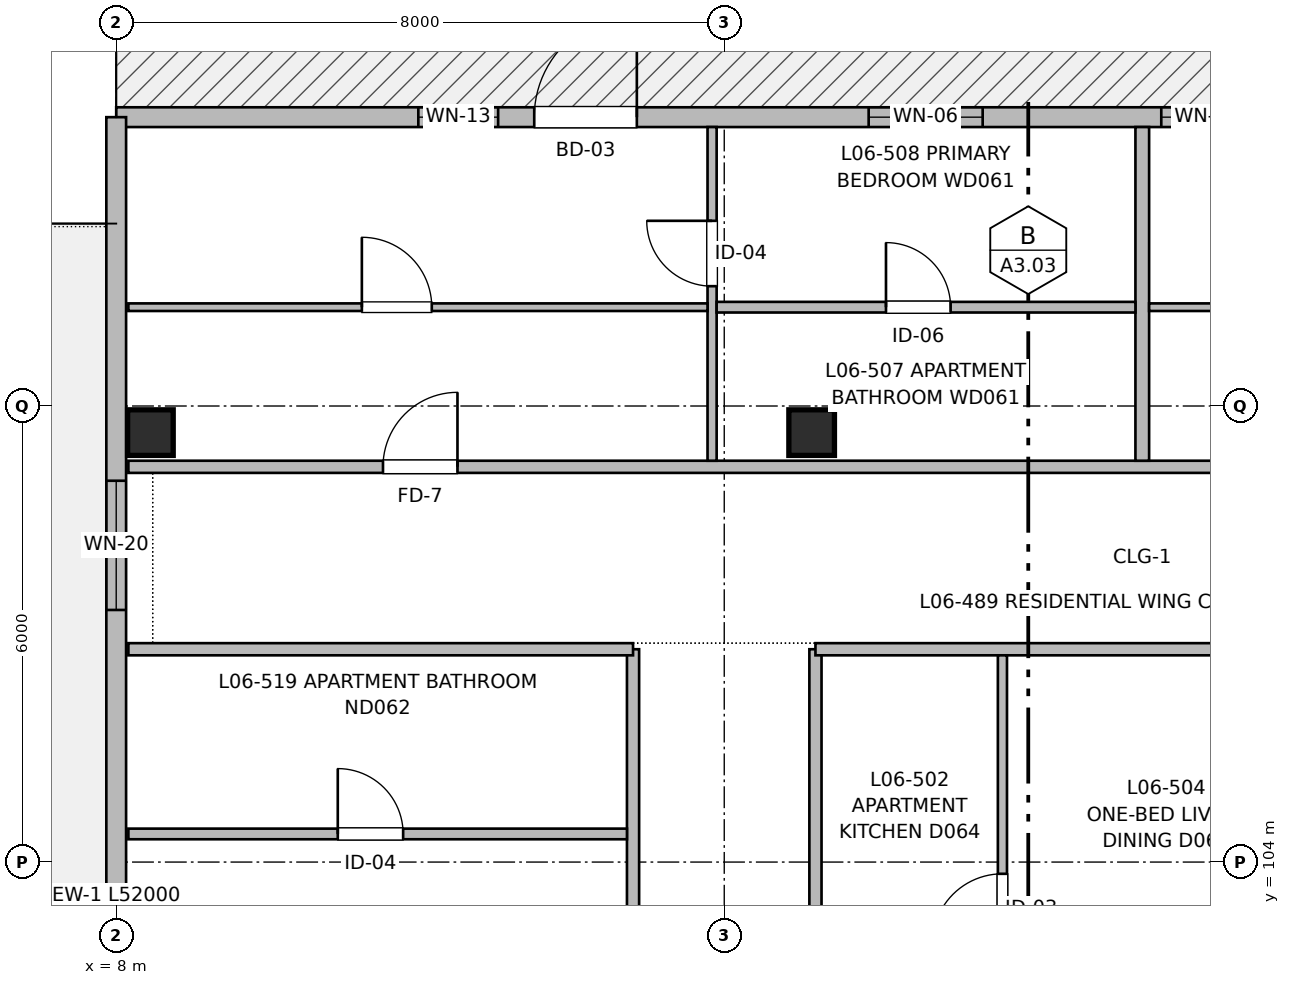
"""IFC4 building model, lengths in metres.
Left out: names, types, materials, properties, quantities, classifications, styles, units other than length and angle.
Written with IfcOpenShell. Run it as: python <this file> out.ifc"""

import sys

from ifc_helpers import new_model, si_unit, direction, frame, frame_2d, origin, origin_2d, place, context, subcontext, project, spatial, rectangle, extrude, element, fill, save


model = new_model("IFC4")
c1 = context("Model", 3, precision=1e-05, world=origin(), true_north=direction((0.0, 1.0)))
c2 = subcontext(c1, "Body", "Model", "MODEL_VIEW")
j1 = project(units=[si_unit("LENGTHUNIT", "METRE"), si_unit("PLANEANGLEUNIT", "RADIAN")], contexts=[c1])
p1 = place(None, origin())
s1 = spatial("IfcSite", under=j1, at=p1, CompositionType="ELEMENT")
p2 = place(p1, origin())
s2 = spatial("IfcBuilding", under=s1, at=p2, CompositionType="ELEMENT")
p3 = place(p2, frame((0.0, 0.0, 20.16)))
s3 = spatial("IfcBuildingStorey", under=s2, at=p3, CompositionType="ELEMENT", Elevation=20.16)
for number, where, z_axis, x_axis in (
    (1, (8.45, 109.65, 0.0), (0.0, 0.0, 1.0), (1.0, 0.0, 0.0)),
    (2, (17.15, 109.65, 0.0), (0.0, 0.0, 1.0), (1.0, 0.0, 0.0)),
):
    element("IfcColumn", number, at=place(p3, frame(where, z_axis=z_axis, x_axis=x_axis)), inside=s3, PredefinedType="COLUMN", context=c2, shape_type="SweptSolid", body=[
        extrude(rectangle(XDim=0.6, YDim=0.6, at=origin_2d()), origin(), (0.0, 0.0, 1.0), 3.2),
    ])
p4 = place(p3, frame((8.0, 113.8, 0.0), z_axis=(0.0, 0.0, 1.0), x_axis=(1.0, 0.0, 0.0)))
e3 = element("IfcWall", 3, at=p4, inside=s3, PredefinedType="SOLIDWALL", context=c2, shape_type="SweptSolid", body=[
    extrude(rectangle(XDim=27.0, YDim=0.26, at=frame_2d((13.5, 0.0))), origin(), (0.0, 0.0, 1.0), 2.98),
])
p5 = place(p4, frame((5.5, 0.0, 0.0)))
e4 = element("IfcOpeningElement", 4, at=p5, cuts=e3, PredefinedType="OPENING", context=c2, shape_type="SweptSolid", body=[
    extrude(rectangle(XDim=1.35, YDim=2.2, at=frame_2d((0.675, 1.1))), frame((0.0, 0.14, 0.0), z_axis=(0.0, -1.0, 0.0), x_axis=(1.0, 0.0, 0.0)), (0.0, 0.0, 1.0), 0.28),
])
p6 = place(p4, frame((3.975, 0.0, 0.9)))
e5 = element("IfcOpeningElement", 5, at=p6, cuts=e3, PredefinedType="OPENING", context=c2, shape_type="SweptSolid", body=[
    extrude(rectangle(XDim=1.05, YDim=1.15, at=frame_2d((0.525, 0.575))), frame((0.0, 0.14, 0.0), z_axis=(0.0, -1.0, 0.0), x_axis=(1.0, 0.0, 0.0)), (0.0, 0.0, 1.0), 0.28),
])
p7 = place(p4, frame((13.75, 0.0, 0.9)))
e6 = element("IfcOpeningElement", 6, at=p7, cuts=e3, PredefinedType="OPENING", context=c2, shape_type="SweptSolid", body=[
    extrude(rectangle(XDim=1.2, YDim=1.05, at=frame_2d((0.6, 0.525))), frame((0.0, 0.14, 0.0), z_axis=(0.0, -1.0, 0.0), x_axis=(1.0, 0.0, 0.0)), (0.0, 0.0, 1.0), 0.28),
])
p8 = place(p4, frame((22.175, 0.0, 0.9)))
e7 = element("IfcOpeningElement", 7, at=p8, cuts=e3, PredefinedType="OPENING", context=c2, shape_type="SweptSolid", body=[
    extrude(rectangle(XDim=0.65, YDim=0.95, at=frame_2d((0.325, 0.475))), frame((0.0, 0.14, 0.0), z_axis=(0.0, -1.0, 0.0), x_axis=(1.0, 0.0, 0.0)), (0.0, 0.0, 1.0), 0.28),
])
p9 = place(p4, frame((9.9, 0.0, 0.82)))
e8 = element("IfcOpeningElement", 8, at=p9, cuts=e3, PredefinedType="OPENING", context=c2, shape_type="SweptSolid", body=[
    extrude(rectangle(XDim=1.5, YDim=1.4, at=frame_2d((0.75, 0.7))), frame((0.0, 0.14, 0.0), z_axis=(0.0, -1.0, 0.0), x_axis=(1.0, 0.0, 0.0)), (0.0, 0.0, 1.0), 0.28),
])
p10 = place(p3, frame((8.0, 61.8, 0.0), z_axis=(0.0, 0.0, 1.0), x_axis=(0.0, 1.0, 0.0)))
e9 = element("IfcWall", 9, at=p10, inside=s3, PredefinedType="SOLIDWALL", context=c2, shape_type="SweptSolid", body=[
    extrude(rectangle(XDim=52.0, YDim=0.26, at=frame_2d((26.0, 0.0))), origin(), (0.0, 0.0, 1.0), 2.98),
])
p11 = place(p10, frame((3.283, 0.0, 0.0)))
e10 = element("IfcOpeningElement", 10, at=p11, cuts=e9, PredefinedType="OPENING", context=c2, shape_type="SweptSolid", body=[
    extrude(rectangle(XDim=1.2, YDim=2.2, at=frame_2d((0.6, 1.1))), frame((0.0, 0.14, 0.0), z_axis=(0.0, -1.0, 0.0), x_axis=(1.0, 0.0, 0.0)), (0.0, 0.0, 1.0), 0.28),
])
p12 = place(p10, frame((6.083, 0.0, 0.57)))
e11 = element("IfcOpeningElement", 11, at=p12, cuts=e9, PredefinedType="OPENING", context=c2, shape_type="SweptSolid", body=[
    extrude(rectangle(XDim=2.3, YDim=1.65, at=frame_2d((1.15, 0.825))), frame((0.0, 0.14, 0.0), z_axis=(0.0, -1.0, 0.0), x_axis=(1.0, 0.0, 0.0)), (0.0, 0.0, 1.0), 0.28),
])
p13 = place(p10, frame((12.85, 0.0, 0.9)))
e12 = element("IfcOpeningElement", 12, at=p13, cuts=e9, PredefinedType="OPENING", context=c2, shape_type="SweptSolid", body=[
    extrude(rectangle(XDim=1.2, YDim=1.05, at=frame_2d((0.6, 0.525))), frame((0.0, 0.14, 0.0), z_axis=(0.0, -1.0, 0.0), x_axis=(1.0, 0.0, 0.0)), (0.0, 0.0, 1.0), 0.28),
])
p14 = place(p10, frame((21.342, 0.0, 0.9)))
e13 = element("IfcOpeningElement", 13, at=p14, cuts=e9, PredefinedType="OPENING", context=c2, shape_type="SweptSolid", body=[
    extrude(rectangle(XDim=0.65, YDim=0.95, at=frame_2d((0.325, 0.475))), frame((0.0, 0.14, 0.0), z_axis=(0.0, -1.0, 0.0), x_axis=(1.0, 0.0, 0.0)), (0.0, 0.0, 1.0), 0.28),
])
p15 = place(p10, frame((29.333, 0.0, 0.62)))
e14 = element("IfcOpeningElement", 14, at=p15, cuts=e9, PredefinedType="OPENING", context=c2, shape_type="SweptSolid", body=[
    extrude(rectangle(XDim=1.1, YDim=1.6, at=frame_2d((0.55, 0.8))), frame((0.0, 0.14, 0.0), z_axis=(0.0, -1.0, 0.0), x_axis=(1.0, 0.0, 0.0)), (0.0, 0.0, 1.0), 0.28),
])
p16 = place(p10, frame((35.3, 0.0, 0.47)))
e15 = element("IfcOpeningElement", 15, at=p16, cuts=e9, PredefinedType="OPENING", context=c2, shape_type="SweptSolid", body=[
    extrude(rectangle(XDim=2.7, YDim=1.75, at=frame_2d((1.35, 0.875))), frame((0.0, 0.14, 0.0), z_axis=(0.0, -1.0, 0.0), x_axis=(1.0, 0.0, 0.0)), (0.0, 0.0, 1.0), 0.28),
])
p17 = place(p10, frame((45.517, 0.0, 0.72)))
e16 = element("IfcOpeningElement", 16, at=p17, cuts=e9, PredefinedType="OPENING", context=c2, shape_type="SweptSolid", body=[
    extrude(rectangle(XDim=1.7, YDim=1.5, at=frame_2d((0.85, 0.75))), frame((0.0, 0.14, 0.0), z_axis=(0.0, -1.0, 0.0), x_axis=(1.0, 0.0, 0.0)), (0.0, 0.0, 1.0), 0.28),
])
p18 = place(p3, frame((14.8, 61.96, 0.0), z_axis=(0.0, 0.0, 1.0), x_axis=(0.0, 1.0, 0.0)))
e17 = element("IfcWall", 17, at=p18, inside=s3, PredefinedType="PARTITIONING", context=c2, shape_type="SweptSolid", body=[
    extrude(rectangle(XDim=44.84, YDim=0.16, at=frame_2d((22.42, 0.0))), origin(), (0.0, 0.0, 1.0), 2.935),
])
p19 = place(p18, frame((7.04, 0.0, 0.0)))
e18 = element("IfcOpeningElement", 18, at=p19, cuts=e17, PredefinedType="OPENING", context=c2, shape_type="SweptSolid", body=[
    extrude(rectangle(XDim=1.1, YDim=2.15, at=frame_2d((0.55, 1.075))), frame((0.0, 0.09, 0.0), z_axis=(0.0, -1.0, 0.0), x_axis=(1.0, 0.0, 0.0)), (0.0, 0.0, 1.0), 0.18),
])
p20 = place(p18, frame((13.44, 0.0, 0.0)))
e19 = element("IfcOpeningElement", 19, at=p20, cuts=e17, PredefinedType="OPENING", context=c2, shape_type="SweptSolid", body=[
    extrude(rectangle(XDim=1.6, YDim=2.15, at=frame_2d((0.8, 1.075))), frame((0.0, 0.09, 0.0), z_axis=(0.0, -1.0, 0.0), x_axis=(1.0, 0.0, 0.0)), (0.0, 0.0, 1.0), 0.18),
])
p21 = place(p18, frame((3.0, 0.0, 0.0)))
e20 = element("IfcOpeningElement", 20, at=p21, cuts=e17, PredefinedType="OPENING", context=c2, shape_type="SweptSolid", body=[
    extrude(rectangle(XDim=0.96, YDim=2.15, at=frame_2d((0.48, 1.075))), frame((0.0, 0.09, 0.0), z_axis=(0.0, -1.0, 0.0), x_axis=(1.0, 0.0, 0.0)), (0.0, 0.0, 1.0), 0.18),
])
p22 = place(p18, frame((27.045, 0.0, 0.0)))
e21 = element("IfcOpeningElement", 21, at=p22, cuts=e17, PredefinedType="OPENING", context=c2, shape_type="SweptSolid", body=[
    extrude(rectangle(XDim=0.98, YDim=2.15, at=frame_2d((0.49, 1.075))), frame((0.0, 0.09, 0.0), z_axis=(0.0, -1.0, 0.0), x_axis=(1.0, 0.0, 0.0)), (0.0, 0.0, 1.0), 0.18),
])
p23 = place(p18, frame((34.855, 0.0, 0.0)))
e22 = element("IfcOpeningElement", 22, at=p23, cuts=e17, PredefinedType="OPENING", context=c2, shape_type="SweptSolid", body=[
    extrude(rectangle(XDim=0.98, YDim=2.15, at=frame_2d((0.49, 1.075))), frame((0.0, 0.09, 0.0), z_axis=(0.0, -1.0, 0.0), x_axis=(1.0, 0.0, 0.0)), (0.0, 0.0, 1.0), 0.18),
])
p24 = place(p3, frame((17.2, 61.96, 0.0), z_axis=(0.0, 0.0, 1.0), x_axis=(0.0, 1.0, 0.0)))
e23 = element("IfcWall", 23, at=p24, inside=s3, PredefinedType="PARTITIONING", context=c2, shape_type="SweptSolid", body=[
    extrude(rectangle(XDim=44.84, YDim=0.16, at=frame_2d((22.42, 0.0))), origin(), (0.0, 0.0, 1.0), 2.935),
])
p25 = place(p24, frame((4.575, 0.0, 0.0)))
e24 = element("IfcOpeningElement", 24, at=p25, cuts=e23, PredefinedType="OPENING", context=c2, shape_type="SweptSolid", body=[
    extrude(rectangle(XDim=1.5, YDim=2.2, at=frame_2d((0.75, 1.1))), frame((0.0, 0.09, 0.0), z_axis=(0.0, -1.0, 0.0), x_axis=(1.0, 0.0, 0.0)), (0.0, 0.0, 1.0), 0.18),
])
p26 = place(p24, frame((17.27, 0.0, 0.0)))
e25 = element("IfcOpeningElement", 25, at=p26, cuts=e23, PredefinedType="OPENING", context=c2, shape_type="SweptSolid", body=[
    extrude(rectangle(XDim=0.98, YDim=2.15, at=frame_2d((0.49, 1.075))), frame((0.0, 0.09, 0.0), z_axis=(0.0, -1.0, 0.0), x_axis=(1.0, 0.0, 0.0)), (0.0, 0.0, 1.0), 0.18),
])
p27 = place(p24, frame((29.39, 0.0, 0.0)))
e26 = element("IfcOpeningElement", 26, at=p27, cuts=e23, PredefinedType="OPENING", context=c2, shape_type="SweptSolid", body=[
    extrude(rectangle(XDim=0.98, YDim=2.15, at=frame_2d((0.49, 1.075))), frame((0.0, 0.09, 0.0), z_axis=(0.0, -1.0, 0.0), x_axis=(1.0, 0.0, 0.0)), (0.0, 0.0, 1.0), 0.18),
])
p28 = place(p24, frame((40.24, 0.0, 0.0)))
e27 = element("IfcOpeningElement", 27, at=p28, cuts=e23, PredefinedType="OPENING", context=c2, shape_type="SweptSolid", body=[
    extrude(rectangle(XDim=0.98, YDim=2.15, at=frame_2d((0.49, 1.075))), frame((0.0, 0.09, 0.0), z_axis=(0.0, -1.0, 0.0), x_axis=(1.0, 0.0, 0.0)), (0.0, 0.0, 1.0), 0.18),
])
p29 = place(p3, frame((8.16, 106.8, 0.0), z_axis=(0.0, 0.0, 1.0), x_axis=(1.0, 0.0, 0.0)))
e28 = element("IfcWall", 28, at=p29, inside=s3, PredefinedType="PARTITIONING", context=c2, shape_type="SweptSolid", body=[
    extrude(rectangle(XDim=6.64, YDim=0.16, at=frame_2d((3.32, 0.0))), origin(), (0.0, 0.0, 1.0), 2.935),
])
p30 = place(p3, frame((17.2, 106.8, 0.0), z_axis=(0.0, 0.0, 1.0), x_axis=(1.0, 0.0, 0.0)))
e29 = element("IfcWall", 29, at=p30, inside=s3, PredefinedType="PARTITIONING", context=c2, shape_type="SweptSolid", body=[
    extrude(rectangle(XDim=17.64, YDim=0.16, at=frame_2d((8.82, 0.0))), origin(), (0.0, 0.0, 1.0), 2.935),
])
p31 = place(p30, frame((13.075, 0.0, 0.0)))
e30 = element("IfcOpeningElement", 30, at=p31, cuts=e29, PredefinedType="OPENING", context=c2, shape_type="SweptSolid", body=[
    extrude(rectangle(XDim=1.05, YDim=2.15, at=frame_2d((0.525, 1.075))), frame((0.0, 0.09, 0.0), z_axis=(0.0, -1.0, 0.0), x_axis=(1.0, 0.0, 0.0)), (0.0, 0.0, 1.0), 0.18),
])
p32 = place(p3, frame((8.16, 109.2, 0.0), z_axis=(0.0, 0.0, 1.0), x_axis=(1.0, 0.0, 0.0)))
e31 = element("IfcWall", 31, at=p32, inside=s3, PredefinedType="PARTITIONING", context=c2, shape_type="SweptSolid", body=[
    extrude(rectangle(XDim=26.68, YDim=0.16, at=frame_2d((13.34, 0.0))), origin(), (0.0, 0.0, 1.0), 2.935),
])
p33 = place(p32, frame((3.35, 0.0, 0.0)))
e32 = element("IfcOpeningElement", 32, at=p33, cuts=e31, PredefinedType="OPENING", context=c2, shape_type="SweptSolid", body=[
    extrude(rectangle(XDim=0.98, YDim=2.15, at=frame_2d((0.49, 1.075))), frame((0.0, 0.09, 0.0), z_axis=(0.0, -1.0, 0.0), x_axis=(1.0, 0.0, 0.0)), (0.0, 0.0, 1.0), 0.18),
])
p34 = place(p32, frame((15.985, 0.0, 0.0)))
e33 = element("IfcOpeningElement", 33, at=p34, cuts=e31, PredefinedType="OPENING", context=c2, shape_type="SweptSolid", body=[
    extrude(rectangle(XDim=0.98, YDim=2.15, at=frame_2d((0.49, 1.075))), frame((0.0, 0.09, 0.0), z_axis=(0.0, -1.0, 0.0), x_axis=(1.0, 0.0, 0.0)), (0.0, 0.0, 1.0), 0.18),
])
p35 = place(p3, frame((19.66, 96.96, 0.0), z_axis=(0.0, 0.0, 1.0), x_axis=(0.0, 1.0, 0.0)))
e34 = element("IfcWall", 34, at=p35, inside=s3, PredefinedType="PARTITIONING", context=c2, shape_type="SweptSolid", body=[
    extrude(rectangle(XDim=9.76, YDim=0.12, at=frame_2d((4.88, 0.0))), origin(), (0.0, 0.0, 1.0), 2.935),
])
p36 = place(p35, frame((1.706, 0.0, 0.0)))
e35 = element("IfcOpeningElement", 35, at=p36, cuts=e34, PredefinedType="OPENING", context=c2, shape_type="SweptSolid", body=[
    extrude(rectangle(XDim=0.86, YDim=2.1, at=frame_2d((0.43, 1.05))), frame((0.0, 0.07, 0.0), z_axis=(0.0, -1.0, 0.0), x_axis=(1.0, 0.0, 0.0)), (0.0, 0.0, 1.0), 0.14),
])
p37 = place(p35, frame((5.966, 0.0, 0.0)))
e36 = element("IfcOpeningElement", 36, at=p37, cuts=e34, PredefinedType="OPENING", context=c2, shape_type="SweptSolid", body=[
    extrude(rectangle(XDim=0.92, YDim=2.1, at=frame_2d((0.46, 1.05))), frame((0.0, 0.07, 0.0), z_axis=(0.0, -1.0, 0.0), x_axis=(1.0, 0.0, 0.0)), (0.0, 0.0, 1.0), 0.14),
])
p38 = place(p3, frame((21.5, 109.28, 0.0), z_axis=(0.0, 0.0, 1.0), x_axis=(0.0, 1.0, 0.0)))
e37 = element("IfcWall", 37, at=p38, inside=s3, PredefinedType="PARTITIONING", context=c2, shape_type="SweptSolid", body=[
    extrude(rectangle(XDim=4.39, YDim=0.18, at=frame_2d((2.195, 0.0))), origin(), (0.0, 0.0, 1.0), 2.935),
])
p39 = place(p3, frame((15.84, 109.28, 0.0), z_axis=(0.0, 0.0, 1.0), x_axis=(0.0, 1.0, 0.0)))
e38 = element("IfcWall", 38, at=p39, inside=s3, PredefinedType="PARTITIONING", context=c2, shape_type="SweptSolid", body=[
    extrude(rectangle(XDim=4.39, YDim=0.12, at=frame_2d((2.195, 0.0))), origin(), (0.0, 0.0, 1.0), 2.935),
])
p40 = place(p39, frame((2.296, 0.0, 0.0)))
e39 = element("IfcOpeningElement", 39, at=p40, cuts=e38, PredefinedType="OPENING", context=c2, shape_type="SweptSolid", body=[
    extrude(rectangle(XDim=0.86, YDim=2.1, at=frame_2d((0.43, 1.05))), frame((0.0, 0.07, 0.0), z_axis=(0.0, -1.0, 0.0), x_axis=(1.0, 0.0, 0.0)), (0.0, 0.0, 1.0), 0.14),
])
p41 = place(p3, frame((15.9, 111.3, 0.0), z_axis=(0.0, 0.0, 1.0), x_axis=(1.0, 0.0, 0.0)))
e40 = element("IfcWall", 40, at=p41, inside=s3, PredefinedType="PARTITIONING", context=c2, shape_type="SweptSolid", body=[
    extrude(rectangle(XDim=5.51, YDim=0.14, at=frame_2d((2.755, 0.0))), origin(), (0.0, 0.0, 1.0), 2.935),
])
p42 = place(p41, frame((2.228, 0.0, 0.0)))
e41 = element("IfcOpeningElement", 41, at=p42, cuts=e40, PredefinedType="OPENING", context=c2, shape_type="SweptSolid", body=[
    extrude(rectangle(XDim=0.85, YDim=2.05, at=frame_2d((0.425, 1.025))), frame((0.0, 0.08, 0.0), z_axis=(0.0, -1.0, 0.0), x_axis=(1.0, 0.0, 0.0)), (0.0, 0.0, 1.0), 0.16),
])
p43 = place(p3, frame((8.16, 111.3, 0.0), z_axis=(0.0, 0.0, 1.0), x_axis=(1.0, 0.0, 0.0)))
e42 = element("IfcWall", 42, at=p43, inside=s3, PredefinedType="PARTITIONING", context=c2, shape_type="SweptSolid", body=[
    extrude(rectangle(XDim=7.62, YDim=0.1, at=frame_2d((3.81, 0.0))), origin(), (0.0, 0.0, 1.0), 2.935),
])
p44 = place(p43, frame((3.072, 0.0, 0.0)))
e43 = element("IfcOpeningElement", 43, at=p44, cuts=e42, PredefinedType="OPENING", context=c2, shape_type="SweptSolid", body=[
    extrude(rectangle(XDim=0.92, YDim=2.1, at=frame_2d((0.46, 1.05))), frame((0.0, 0.06, 0.0), z_axis=(0.0, -1.0, 0.0), x_axis=(1.0, 0.0, 0.0)), (0.0, 0.0, 1.0), 0.12),
])
p45 = place(p3, frame((21.59, 111.3, 0.0), z_axis=(0.0, 0.0, 1.0), x_axis=(1.0, 0.0, 0.0)))
e44 = element("IfcWall", 44, at=p45, inside=s3, PredefinedType="PARTITIONING", context=c2, shape_type="SweptSolid", body=[
    extrude(rectangle(XDim=7.63, YDim=0.1, at=frame_2d((3.815, 0.0))), origin(), (0.0, 0.0, 1.0), 2.935),
])
p46 = place(p45, frame((2.676, 0.0, 0.0)))
e45 = element("IfcOpeningElement", 45, at=p46, cuts=e44, PredefinedType="OPENING", context=c2, shape_type="SweptSolid", body=[
    extrude(rectangle(XDim=0.92, YDim=2.1, at=frame_2d((0.46, 1.05))), frame((0.0, 0.06, 0.0), z_axis=(0.0, -1.0, 0.0), x_axis=(1.0, 0.0, 0.0)), (0.0, 0.0, 1.0), 0.12),
])
p47 = place(p3, frame((8.16, 104.37, 0.0), z_axis=(0.0, 0.0, 1.0), x_axis=(1.0, 0.0, 0.0)))
e46 = element("IfcWall", 46, at=p47, inside=s3, PredefinedType="PARTITIONING", context=c2, shape_type="SweptSolid", body=[
    extrude(rectangle(XDim=6.56, YDim=0.14, at=frame_2d((3.28, 0.0))), origin(), (0.0, 0.0, 1.0), 2.935),
])
p48 = place(p47, frame((2.755, 0.0, 0.0)))
e47 = element("IfcOpeningElement", 47, at=p48, cuts=e46, PredefinedType="OPENING", context=c2, shape_type="SweptSolid", body=[
    extrude(rectangle(XDim=0.86, YDim=2.1, at=frame_2d((0.43, 1.05))), frame((0.0, 0.08, 0.0), z_axis=(0.0, -1.0, 0.0), x_axis=(1.0, 0.0, 0.0)), (0.0, 0.0, 1.0), 0.16),
])
p49 = place(p5, origin())
e48 = element("IfcDoor", 48, at=p49, inside=s3, OperationType="SINGLE_SWING_RIGHT", PredefinedType="DOOR", context=c2, shape_type="SweptSolid", body=[
    extrude(rectangle(XDim=1.35, YDim=2.2, at=frame_2d((0.675, 1.1))), frame((0.0, 0.025, 0.0), z_axis=(0.0, -1.0, 0.0), x_axis=(1.0, 0.0, 0.0)), (0.0, 0.0, 1.0), 0.05),
])
fill(e4, e48)
p50 = place(p6, origin())
e49 = element("IfcWindow", 49, at=p50, inside=s3, PartitioningType="SINGLE_PANEL", PredefinedType="WINDOW", context=c2, shape_type="SweptSolid", body=[
    extrude(rectangle(XDim=1.05, YDim=1.15, at=frame_2d((0.525, 0.575))), frame((0.0, 0.03, 0.0), z_axis=(0.0, -1.0, 0.0), x_axis=(1.0, 0.0, 0.0)), (0.0, 0.0, 1.0), 0.06),
])
fill(e5, e49)
p51 = place(p7, origin())
e50 = element("IfcWindow", 50, at=p51, inside=s3, PartitioningType="SINGLE_PANEL", PredefinedType="WINDOW", context=c2, shape_type="SweptSolid", body=[
    extrude(rectangle(XDim=1.2, YDim=1.05, at=frame_2d((0.6, 0.525))), frame((0.0, 0.03, 0.0), z_axis=(0.0, -1.0, 0.0), x_axis=(1.0, 0.0, 0.0)), (0.0, 0.0, 1.0), 0.06),
])
fill(e6, e50)
p52 = place(p17, origin())
e51 = element("IfcWindow", 51, at=p52, inside=s3, PartitioningType="SINGLE_PANEL", PredefinedType="WINDOW", context=c2, shape_type="SweptSolid", body=[
    extrude(rectangle(XDim=1.7, YDim=1.5, at=frame_2d((0.85, 0.75))), frame((0.0, 0.03, 0.0), z_axis=(0.0, -1.0, 0.0), x_axis=(1.0, 0.0, 0.0)), (0.0, 0.0, 1.0), 0.06),
])
fill(e16, e51)
p53 = place(p37, origin())
e52 = element("IfcDoor", 52, at=p53, inside=s3, OperationType="SINGLE_SWING_LEFT", PredefinedType="DOOR", context=c2, shape_type="SweptSolid", body=[
    extrude(rectangle(XDim=0.92, YDim=2.1, at=frame_2d((0.46, 1.05))), frame((0.0, 0.025, 0.0), z_axis=(0.0, -1.0, 0.0), x_axis=(1.0, 0.0, 0.0)), (0.0, 0.0, 1.0), 0.05),
])
fill(e36, e52)
p54 = place(p33, origin())
e53 = element("IfcDoor", 53, at=p54, inside=s3, OperationType="SINGLE_SWING_RIGHT", PredefinedType="DOOR", context=c2, shape_type="SweptSolid", body=[
    extrude(rectangle(XDim=0.98, YDim=2.15, at=frame_2d((0.49, 1.075))), frame((0.0, 0.025, 0.0), z_axis=(0.0, -1.0, 0.0), x_axis=(1.0, 0.0, 0.0)), (0.0, 0.0, 1.0), 0.05),
])
fill(e32, e53)
p55 = place(p44, origin())
e54 = element("IfcDoor", 54, at=p55, inside=s3, OperationType="SINGLE_SWING_LEFT", PredefinedType="DOOR", context=c2, shape_type="SweptSolid", body=[
    extrude(rectangle(XDim=0.92, YDim=2.1, at=frame_2d((0.46, 1.05))), frame((0.0, 0.025, 0.0), z_axis=(0.0, -1.0, 0.0), x_axis=(1.0, 0.0, 0.0)), (0.0, 0.0, 1.0), 0.05),
])
fill(e43, e54)
p56 = place(p40, origin())
e55 = element("IfcDoor", 55, at=p56, inside=s3, OperationType="SINGLE_SWING_RIGHT", PredefinedType="DOOR", context=c2, shape_type="SweptSolid", body=[
    extrude(rectangle(XDim=0.86, YDim=2.1, at=frame_2d((0.43, 1.05))), frame((0.0, 0.025, 0.0), z_axis=(0.0, -1.0, 0.0), x_axis=(1.0, 0.0, 0.0)), (0.0, 0.0, 1.0), 0.05),
])
fill(e39, e55)
p57 = place(p42, origin())
e56 = element("IfcDoor", 56, at=p57, inside=s3, OperationType="SINGLE_SWING_LEFT", PredefinedType="DOOR", context=c2, shape_type="SweptSolid", body=[
    extrude(rectangle(XDim=0.85, YDim=2.05, at=frame_2d((0.425, 1.025))), frame((0.0, 0.025, 0.0), z_axis=(0.0, -1.0, 0.0), x_axis=(1.0, 0.0, 0.0)), (0.0, 0.0, 1.0), 0.05),
])
fill(e41, e56)
p58 = place(p48, origin())
e57 = element("IfcDoor", 57, at=p58, inside=s3, OperationType="SINGLE_SWING_LEFT", PredefinedType="DOOR", context=c2, shape_type="SweptSolid", body=[
    extrude(rectangle(XDim=0.86, YDim=2.1, at=frame_2d((0.43, 1.05))), frame((0.0, 0.025, 0.0), z_axis=(0.0, -1.0, 0.0), x_axis=(1.0, 0.0, 0.0)), (0.0, 0.0, 1.0), 0.05),
])
fill(e47, e57)
p59 = place(p9, origin())
e58 = element("IfcWindow", 58, at=p59, inside=s3, PartitioningType="SINGLE_PANEL", PredefinedType="WINDOW", context=c2, shape_type="SweptSolid", body=[
    extrude(rectangle(XDim=1.5, YDim=1.4, at=frame_2d((0.75, 0.7))), frame((0.0, 0.03, 0.0), z_axis=(0.0, -1.0, 0.0), x_axis=(1.0, 0.0, 0.0)), (0.0, 0.0, 1.0), 0.06),
])
fill(e8, e58)
save(model, sys.argv[1])
